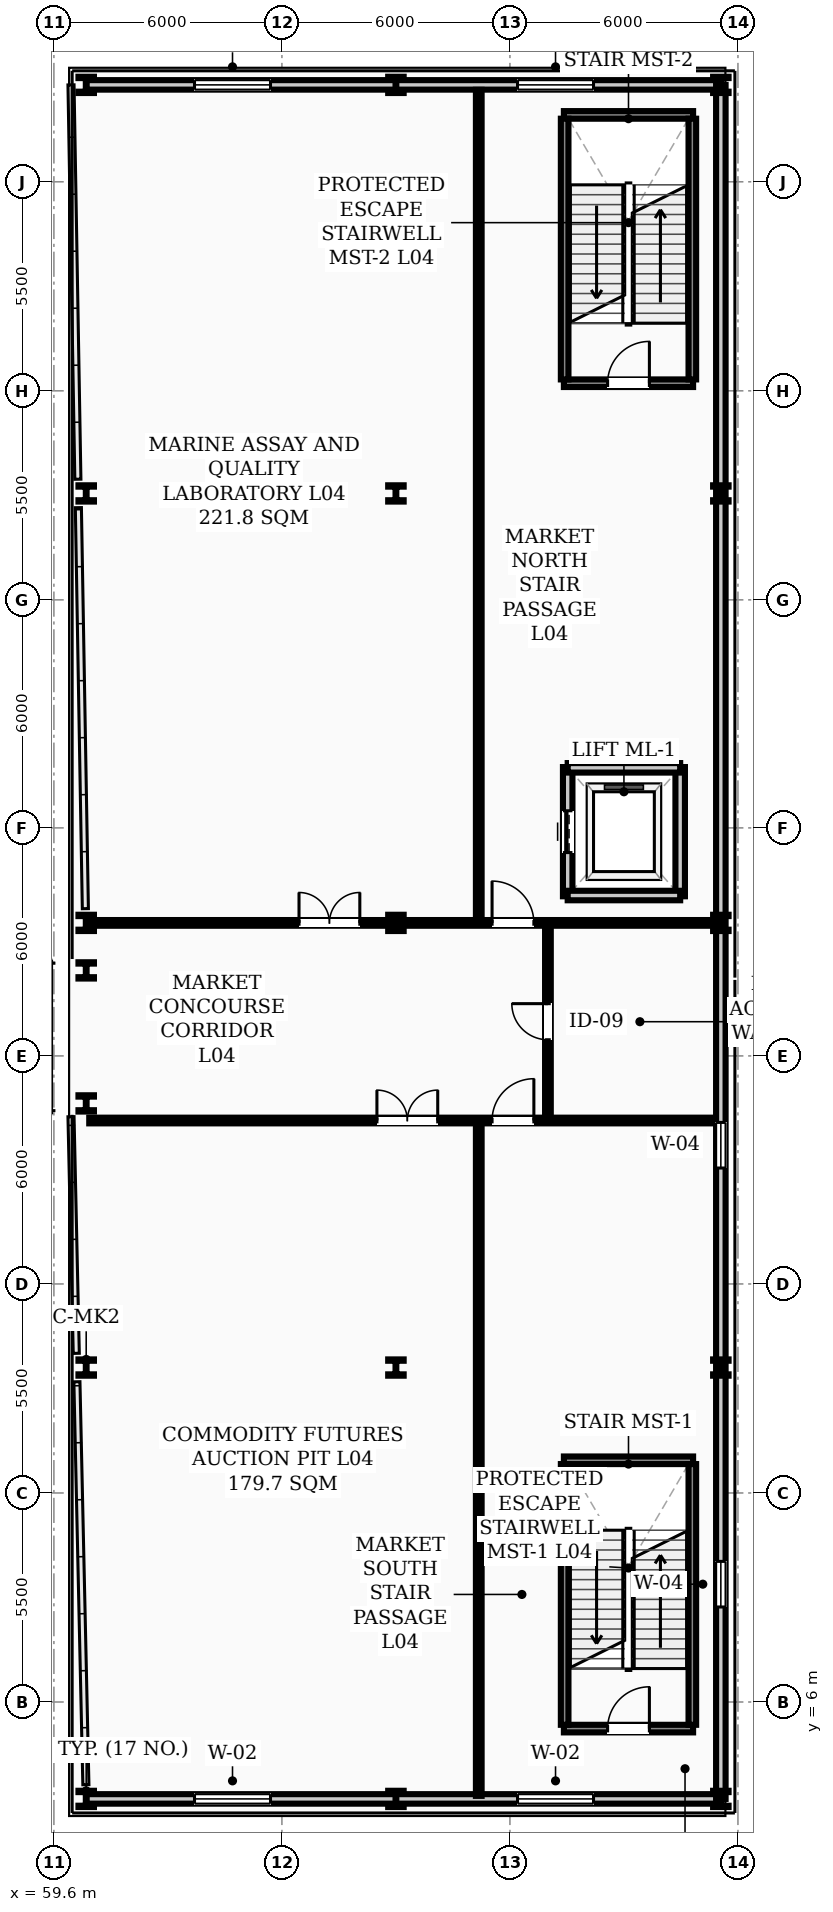
"""IFC4 building model, lengths in metres.
Left out: names, types, materials, properties, quantities, classifications, styles, units other than length and angle.
Written with IfcOpenShell. Run it as: python <this file> out.ifc"""

import sys

from ifc_helpers import new_model, si_unit, direction, frame, frame_2d, origin, origin_2d, place, context, subcontext, project, spatial, rectangle, i_section, extrude, element, fill, save


model = new_model("IFC4")
c1 = context("Model", 3, precision=1e-05, world=origin(), true_north=direction((0.0, 1.0)))
c2 = subcontext(c1, "Body", "Model", "MODEL_VIEW")
j1 = project(units=[si_unit("LENGTHUNIT", "METRE"), si_unit("PLANEANGLEUNIT", "RADIAN")], contexts=[c1])
p1 = place(None, origin())
s1 = spatial("IfcSite", under=j1, at=p1, CompositionType="ELEMENT")
p2 = place(p1, origin())
s2 = spatial("IfcBuilding", under=s1, at=p2, CompositionType="ELEMENT")
p3 = place(p2, frame((0.0, 0.0, 16.6)))
s3 = spatial("IfcBuildingStorey", under=s2, at=p3, CompositionType="ELEMENT", Elevation=16.6)
for number, where, z_axis, x_axis in (
    (1, (60.45, 3.45, 0.0), (0.0, 0.0, 1.0), (1.0, 0.0, 0.0)),
    (2, (60.45, 14.8, 0.0), (0.0, 0.0, 1.0), (1.0, 0.0, 0.0)),
    (3, (60.45, 21.75, 0.0), (0.0, 0.0, 1.0), (1.0, 0.0, 0.0)),
    (4, (60.45, 25.25, 0.0), (0.0, 0.0, 1.0), (1.0, 0.0, 0.0)),
    (5, (60.45, 26.5, 0.0), (0.0, 0.0, 1.0), (1.0, 0.0, 0.0)),
    (6, (60.45, 37.8, 0.0), (0.0, 0.0, 1.0), (1.0, 0.0, 0.0)),
    (7, (60.45, 48.55, 0.0), (0.0, 0.0, 1.0), (1.0, 0.0, 0.0)),
    (8, (68.6, 3.45, 0.0), (0.0, 0.0, 1.0), (1.0, 0.0, 0.0)),
    (9, (68.6, 14.8, 0.0), (0.0, 0.0, 1.0), (1.0, 0.0, 0.0)),
    (10, (68.6, 26.5, 0.0), (0.0, 0.0, 1.0), (1.0, 0.0, 0.0)),
    (11, (68.6, 37.8, 0.0), (0.0, 0.0, 1.0), (1.0, 0.0, 0.0)),
    (12, (68.6, 48.55, 0.0), (0.0, 0.0, 1.0), (1.0, 0.0, 0.0)),
    (13, (77.15, 3.45, 0.0), (0.0, 0.0, 1.0), (1.0, 0.0, 0.0)),
    (14, (77.15, 14.8, 0.0), (0.0, 0.0, 1.0), (1.0, 0.0, 0.0)),
    (15, (77.15, 26.5, 0.0), (0.0, 0.0, 1.0), (1.0, 0.0, 0.0)),
    (16, (77.15, 37.8, 0.0), (0.0, 0.0, 1.0), (1.0, 0.0, 0.0)),
    (17, (77.15, 48.55, 0.0), (0.0, 0.0, 1.0), (1.0, 0.0, 0.0)),
):
    element("IfcColumn", number, at=place(p3, frame(where, z_axis=z_axis, x_axis=x_axis)), inside=s3, PredefinedType="COLUMN", context=c2, shape_type="SweptSolid", body=[
        extrude(i_section(OverallWidth=0.407, OverallDepth=0.428, WebThickness=0.02, FlangeThickness=0.035, FilletRadius=0.022, at=origin_2d()), origin(), (0.0, 0.0, 1.0), 5.4),
    ])
p4 = place(p3, frame((60.45, 3.45, 0.0), z_axis=(0.0, 0.0, 1.0), x_axis=(1.0, 0.0, 0.0)))
e18 = element("IfcWall", 18, at=p4, inside=s3, PredefinedType="STANDARD", context=c2, shape_type="SweptSolid", body=[
    extrude(rectangle(XDim=16.7, YDim=0.25, at=frame_2d((8.35, 0.0))), origin(), (0.0, 0.0, 1.0), 4.51),
])
p5 = place(p4, frame((2.85, 0.0, 0.95)))
e19 = element("IfcOpeningElement", 19, at=p5, cuts=e18, PredefinedType="OPENING", context=c2, shape_type="SweptSolid", body=[
    extrude(rectangle(XDim=2.0, YDim=1.8, at=frame_2d((1.0, 0.9))), frame((0.0, 0.135, 0.0), z_axis=(0.0, -1.0, 0.0), x_axis=(1.0, 0.0, 0.0)), (0.0, 0.0, 1.0), 0.27),
])
p6 = place(p4, frame((11.35, 0.0, 0.95)))
e20 = element("IfcOpeningElement", 20, at=p6, cuts=e18, PredefinedType="OPENING", context=c2, shape_type="SweptSolid", body=[
    extrude(rectangle(XDim=2.0, YDim=1.8, at=frame_2d((1.0, 0.9))), frame((0.0, 0.135, 0.0), z_axis=(0.0, -1.0, 0.0), x_axis=(1.0, 0.0, 0.0)), (0.0, 0.0, 1.0), 0.27),
])
p7 = place(p3, frame((60.45, 48.55, 0.0), z_axis=(0.0, 0.0, 1.0), x_axis=(1.0, 0.0, 0.0)))
e21 = element("IfcWall", 21, at=p7, inside=s3, PredefinedType="STANDARD", context=c2, shape_type="SweptSolid", body=[
    extrude(rectangle(XDim=16.7, YDim=0.25, at=frame_2d((8.35, 0.0))), origin(), (0.0, 0.0, 1.0), 4.51),
])
p8 = place(p7, frame((2.85, 0.0, 0.95)))
e22 = element("IfcOpeningElement", 22, at=p8, cuts=e21, PredefinedType="OPENING", context=c2, shape_type="SweptSolid", body=[
    extrude(rectangle(XDim=2.0, YDim=1.8, at=frame_2d((1.0, 0.9))), frame((0.0, 0.135, 0.0), z_axis=(0.0, -1.0, 0.0), x_axis=(1.0, 0.0, 0.0)), (0.0, 0.0, 1.0), 0.27),
])
p9 = place(p7, frame((11.35, 0.0, 0.95)))
e23 = element("IfcOpeningElement", 23, at=p9, cuts=e21, PredefinedType="OPENING", context=c2, shape_type="SweptSolid", body=[
    extrude(rectangle(XDim=2.0, YDim=1.8, at=frame_2d((1.0, 0.9))), frame((0.0, 0.135, 0.0), z_axis=(0.0, -1.0, 0.0), x_axis=(1.0, 0.0, 0.0)), (0.0, 0.0, 1.0), 0.27),
])
p10 = place(p3, frame((77.15, 3.45, 0.0), z_axis=(0.0, 0.0, 1.0), x_axis=(0.0, 1.0, 0.0)))
e24 = element("IfcWall", 24, at=p10, inside=s3, PredefinedType="STANDARD", context=c2, shape_type="SweptSolid", body=[
    extrude(rectangle(XDim=45.1, YDim=0.25, at=frame_2d((22.55, 0.0))), origin(), (0.0, 0.0, 1.0), 4.51),
])
p11 = place(p10, frame((5.05, 0.0, 0.95)))
e25 = element("IfcOpeningElement", 25, at=p11, cuts=e24, PredefinedType="OPENING", context=c2, shape_type="SweptSolid", body=[
    extrude(rectangle(XDim=1.2, YDim=1.2, at=frame_2d((0.6, 0.6))), frame((0.0, 0.135, 0.0), z_axis=(0.0, -1.0, 0.0), x_axis=(1.0, 0.0, 0.0)), (0.0, 0.0, 1.0), 0.27),
])
p12 = place(p10, frame((16.6, 0.0, 0.95)))
e26 = element("IfcOpeningElement", 26, at=p12, cuts=e24, PredefinedType="OPENING", context=c2, shape_type="SweptSolid", body=[
    extrude(rectangle(XDim=1.2, YDim=1.2, at=frame_2d((0.6, 0.6))), frame((0.0, 0.135, 0.0), z_axis=(0.0, -1.0, 0.0), x_axis=(1.0, 0.0, 0.0)), (0.0, 0.0, 1.0), 0.27),
])
p13 = place(p3, frame((73.02, 5.3, 0.0), z_axis=(0.0, 0.0, 1.0), x_axis=(1.0, 0.0, 0.0)))
e27 = element("IfcWall", 27, at=p13, inside=s3, PredefinedType="STANDARD", context=c2, shape_type="SweptSolid", body=[
    extrude(rectangle(XDim=3.4, YDim=0.2, at=frame_2d((1.7, 0.0))), origin(), (0.0, 0.0, 1.0), 5.18),
])
p14 = place(p13, frame((1.15, 0.0, 0.0)))
e28 = element("IfcOpeningElement", 28, at=p14, cuts=e27, PredefinedType="OPENING", context=c2, shape_type="SweptSolid", body=[
    extrude(rectangle(XDim=1.1, YDim=2.08, at=frame_2d((0.55, 1.04))), frame((0.0, 0.11, 0.0), z_axis=(0.0, -1.0, 0.0), x_axis=(1.0, 0.0, 0.0)), (0.0, 0.0, 1.0), 0.22),
])
p15 = place(p3, frame((73.02, 12.36, 0.0), z_axis=(0.0, 0.0, 1.0), x_axis=(1.0, 0.0, 0.0)))
e29 = element("IfcWall", 29, at=p15, inside=s3, PredefinedType="STANDARD", context=c2, shape_type="SweptSolid", body=[
    extrude(rectangle(XDim=3.4, YDim=0.2, at=frame_2d((1.7, 0.0))), origin(), (0.0, 0.0, 1.0), 5.18),
])
for number, where, z_axis, x_axis in (
    (30, (73.04, 5.4, 0.0), (0.0, 0.0, 1.0), (0.0, 1.0, 0.0)),
    (31, (76.4, 5.4, 0.0), (0.0, 0.0, 1.0), (0.0, 1.0, 0.0)),
):
    element("IfcWall", number, at=place(p3, frame(where, z_axis=z_axis, x_axis=x_axis)), inside=s3, PredefinedType="STANDARD", context=c2, shape_type="SweptSolid", body=[
        extrude(rectangle(XDim=6.86, YDim=0.2, at=frame_2d((3.43, 0.0))), origin(), (0.0, 0.0, 1.0), 5.18),
    ])
p16 = place(p3, frame((73.02, 40.7, 0.0), z_axis=(0.0, 0.0, 1.0), x_axis=(1.0, 0.0, 0.0)))
e32 = element("IfcWall", 32, at=p16, inside=s3, PredefinedType="STANDARD", context=c2, shape_type="SweptSolid", body=[
    extrude(rectangle(XDim=3.4, YDim=0.2, at=frame_2d((1.7, 0.0))), origin(), (0.0, 0.0, 1.0), 5.18),
])
p17 = place(p16, frame((1.15, 0.0, 0.0)))
e33 = element("IfcOpeningElement", 33, at=p17, cuts=e32, PredefinedType="OPENING", context=c2, shape_type="SweptSolid", body=[
    extrude(rectangle(XDim=1.1, YDim=2.08, at=frame_2d((0.55, 1.04))), frame((0.0, 0.11, 0.0), z_axis=(0.0, -1.0, 0.0), x_axis=(1.0, 0.0, 0.0)), (0.0, 0.0, 1.0), 0.22),
])
p18 = place(p3, frame((73.02, 47.76, 0.0), z_axis=(0.0, 0.0, 1.0), x_axis=(1.0, 0.0, 0.0)))
e34 = element("IfcWall", 34, at=p18, inside=s3, PredefinedType="STANDARD", context=c2, shape_type="SweptSolid", body=[
    extrude(rectangle(XDim=3.4, YDim=0.2, at=frame_2d((1.7, 0.0))), origin(), (0.0, 0.0, 1.0), 5.18),
])
for number, where, z_axis, x_axis in (
    (35, (73.04, 40.8, 0.0), (0.0, 0.0, 1.0), (0.0, 1.0, 0.0)),
    (36, (76.4, 40.8, 0.0), (0.0, 0.0, 1.0), (0.0, 1.0, 0.0)),
):
    element("IfcWall", number, at=place(p3, frame(where, z_axis=z_axis, x_axis=x_axis)), inside=s3, PredefinedType="STANDARD", context=c2, shape_type="SweptSolid", body=[
        extrude(rectangle(XDim=6.86, YDim=0.2, at=frame_2d((3.43, 0.0))), origin(), (0.0, 0.0, 1.0), 5.18),
    ])
p19 = place(p3, frame((73.12, 27.2, 0.0), z_axis=(0.0, 0.0, 1.0), x_axis=(0.0, 1.0, 0.0)))
e37 = element("IfcWall", 37, at=p19, inside=s3, PredefinedType="STANDARD", context=c2, shape_type="SweptSolid", body=[
    extrude(rectangle(XDim=3.4, YDim=0.25, at=frame_2d((1.7, 0.0))), origin(), (0.0, 0.0, 1.0), 5.16),
])
p20 = place(p19, frame((1.15, 0.0, 0.0)))
e38 = element("IfcOpeningElement", 38, at=p20, cuts=e37, PredefinedType="OPENING", context=c2, shape_type="SweptSolid", body=[
    extrude(rectangle(XDim=1.1, YDim=2.08, at=frame_2d((0.55, 1.04))), frame((0.0, 0.135, 0.0), z_axis=(0.0, -1.0, 0.0), x_axis=(1.0, 0.0, 0.0)), (0.0, 0.0, 1.0), 0.27),
])
p21 = place(p3, frame((76.08, 27.2, 0.0), z_axis=(0.0, 0.0, 1.0), x_axis=(0.0, 1.0, 0.0)))
e39 = element("IfcWall", 39, at=p21, inside=s3, PredefinedType="STANDARD", context=c2, shape_type="SweptSolid", body=[
    extrude(rectangle(XDim=3.4, YDim=0.25, at=frame_2d((1.7, 0.0))), origin(), (0.0, 0.0, 1.0), 5.16),
])
for number, where, z_axis, x_axis in (
    (40, (73.12, 27.22, 0.0), (0.0, 0.0, 1.0), (1.0, 0.0, 0.0)),
    (41, (73.12, 30.58, 0.0), (0.0, 0.0, 1.0), (1.0, 0.0, 0.0)),
):
    element("IfcWall", number, at=place(p3, frame(where, z_axis=z_axis, x_axis=x_axis)), inside=s3, PredefinedType="STANDARD", context=c2, shape_type="SweptSolid", body=[
        extrude(rectangle(XDim=2.96, YDim=0.25, at=frame_2d((1.48, 0.0))), origin(), (0.0, 0.0, 1.0), 5.16),
    ])
p22 = place(p3, frame((60.53, 21.3, 0.0), z_axis=(0.0, 0.0, 1.0), x_axis=(1.0, 0.0, 0.0)))
e42 = element("IfcWall", 42, at=p22, inside=s3, PredefinedType="PARTITIONING", context=c2, shape_type="SweptSolid", body=[
    extrude(rectangle(XDim=16.49, YDim=0.15, at=frame_2d((8.245, 0.0))), origin(), (0.0, 0.0, 1.0), 4.56),
])
p23 = place(p22, frame((7.57, 0.0, 0.0)))
e43 = element("IfcOpeningElement", 43, at=p23, cuts=e42, PredefinedType="OPENING", context=c2, shape_type="SweptSolid", body=[
    extrude(rectangle(XDim=1.6, YDim=2.08, at=frame_2d((0.8, 1.04))), frame((0.0, 0.085, 0.0), z_axis=(0.0, -1.0, 0.0), x_axis=(1.0, 0.0, 0.0)), (0.0, 0.0, 1.0), 0.17),
])
p24 = place(p22, frame((10.6, 0.0, 0.0)))
e44 = element("IfcOpeningElement", 44, at=p24, cuts=e42, PredefinedType="OPENING", context=c2, shape_type="SweptSolid", body=[
    extrude(rectangle(XDim=1.1, YDim=2.08, at=frame_2d((0.55, 1.04))), frame((0.0, 0.085, 0.0), z_axis=(0.0, -1.0, 0.0), x_axis=(1.0, 0.0, 0.0)), (0.0, 0.0, 1.0), 0.17),
])
p25 = place(p3, frame((60.53, 26.5, 0.0), z_axis=(0.0, 0.0, 1.0), x_axis=(1.0, 0.0, 0.0)))
e45 = element("IfcWall", 45, at=p25, inside=s3, PredefinedType="PARTITIONING", context=c2, shape_type="SweptSolid", body=[
    extrude(rectangle(XDim=16.49, YDim=0.15, at=frame_2d((8.245, 0.0))), origin(), (0.0, 0.0, 1.0), 4.56),
])
p26 = place(p25, frame((5.52, 0.0, 0.0)))
e46 = element("IfcOpeningElement", 46, at=p26, cuts=e45, PredefinedType="OPENING", context=c2, shape_type="SweptSolid", body=[
    extrude(rectangle(XDim=1.6, YDim=2.08, at=frame_2d((0.8, 1.04))), frame((0.0, 0.085, 0.0), z_axis=(0.0, -1.0, 0.0), x_axis=(1.0, 0.0, 0.0)), (0.0, 0.0, 1.0), 0.17),
])
p27 = place(p25, frame((10.6, 0.0, 0.0)))
e47 = element("IfcOpeningElement", 47, at=p27, cuts=e45, PredefinedType="OPENING", context=c2, shape_type="SweptSolid", body=[
    extrude(rectangle(XDim=1.1, YDim=2.08, at=frame_2d((0.55, 1.04))), frame((0.0, 0.085, 0.0), z_axis=(0.0, -1.0, 0.0), x_axis=(1.0, 0.0, 0.0)), (0.0, 0.0, 1.0), 0.17),
])
p28 = place(p3, frame((72.6, 21.385, 0.0), z_axis=(0.0, 0.0, 1.0), x_axis=(0.0, 1.0, 0.0)))
e48 = element("IfcWall", 48, at=p28, inside=s3, PredefinedType="PARTITIONING", context=c2, shape_type="SweptSolid", body=[
    extrude(rectangle(XDim=5.03, YDim=0.15, at=frame_2d((2.515, 0.0))), origin(), (0.0, 0.0, 1.0), 4.56),
])
p29 = place(p28, frame((2.04, 0.0, 0.0)))
e49 = element("IfcOpeningElement", 49, at=p29, cuts=e48, PredefinedType="OPENING", context=c2, shape_type="SweptSolid", body=[
    extrude(rectangle(XDim=0.95, YDim=2.08, at=frame_2d((0.475, 1.04))), frame((0.0, 0.085, 0.0), z_axis=(0.0, -1.0, 0.0), x_axis=(1.0, 0.0, 0.0)), (0.0, 0.0, 1.0), 0.17),
])
p30 = place(p3, frame((70.78, 3.53, 0.0), z_axis=(0.0, 0.0, 1.0), x_axis=(0.0, 1.0, 0.0)))
e50 = element("IfcWall", 50, at=p30, inside=s3, PredefinedType="PARTITIONING", context=c2, shape_type="SweptSolid", body=[
    extrude(rectangle(XDim=17.685, YDim=0.15, at=frame_2d((8.843, 0.0))), origin(), (0.0, 0.0, 1.0), 4.56),
])
p31 = place(p3, frame((70.78, 26.585, 0.0), z_axis=(0.0, 0.0, 1.0), x_axis=(0.0, 1.0, 0.0)))
e51 = element("IfcWall", 51, at=p31, inside=s3, PredefinedType="PARTITIONING", context=c2, shape_type="SweptSolid", body=[
    extrude(rectangle(XDim=21.835, YDim=0.15, at=frame_2d((10.917, 0.0))), origin(), (0.0, 0.0, 1.0), 4.56),
])
p32 = place(p5, origin())
e52 = element("IfcWindow", 52, at=p32, inside=s3, PartitioningType="SINGLE_PANEL", PredefinedType="WINDOW", context=c2, shape_type="SweptSolid", body=[
    extrude(rectangle(XDim=2.0, YDim=1.8, at=frame_2d((1.0, 0.9))), frame((0.0, 0.03, 0.0), z_axis=(0.0, -1.0, 0.0), x_axis=(1.0, 0.0, 0.0)), (0.0, 0.0, 1.0), 0.06),
])
fill(e19, e52)
p33 = place(p8, origin())
e53 = element("IfcWindow", 53, at=p33, inside=s3, PartitioningType="SINGLE_PANEL", PredefinedType="WINDOW", context=c2, shape_type="SweptSolid", body=[
    extrude(rectangle(XDim=2.0, YDim=1.8, at=frame_2d((1.0, 0.9))), frame((0.0, 0.03, 0.0), z_axis=(0.0, -1.0, 0.0), x_axis=(1.0, 0.0, 0.0)), (0.0, 0.0, 1.0), 0.06),
])
fill(e22, e53)
p34 = place(p6, origin())
e54 = element("IfcWindow", 54, at=p34, inside=s3, PartitioningType="SINGLE_PANEL", PredefinedType="WINDOW", context=c2, shape_type="SweptSolid", body=[
    extrude(rectangle(XDim=2.0, YDim=1.8, at=frame_2d((1.0, 0.9))), frame((0.0, 0.03, 0.0), z_axis=(0.0, -1.0, 0.0), x_axis=(1.0, 0.0, 0.0)), (0.0, 0.0, 1.0), 0.06),
])
fill(e20, e54)
p35 = place(p9, origin())
e55 = element("IfcWindow", 55, at=p35, inside=s3, PartitioningType="SINGLE_PANEL", PredefinedType="WINDOW", context=c2, shape_type="SweptSolid", body=[
    extrude(rectangle(XDim=2.0, YDim=1.8, at=frame_2d((1.0, 0.9))), frame((0.0, 0.03, 0.0), z_axis=(0.0, -1.0, 0.0), x_axis=(1.0, 0.0, 0.0)), (0.0, 0.0, 1.0), 0.06),
])
fill(e23, e55)
p36 = place(p11, origin())
e56 = element("IfcWindow", 56, at=p36, inside=s3, PartitioningType="SINGLE_PANEL", PredefinedType="WINDOW", context=c2, shape_type="SweptSolid", body=[
    extrude(rectangle(XDim=1.2, YDim=1.2, at=frame_2d((0.6, 0.6))), frame((0.0, 0.03, 0.0), z_axis=(0.0, -1.0, 0.0), x_axis=(1.0, 0.0, 0.0)), (0.0, 0.0, 1.0), 0.06),
])
fill(e25, e56)
p37 = place(p12, origin())
e57 = element("IfcWindow", 57, at=p37, inside=s3, PartitioningType="SINGLE_PANEL", PredefinedType="WINDOW", context=c2, shape_type="SweptSolid", body=[
    extrude(rectangle(XDim=1.2, YDim=1.2, at=frame_2d((0.6, 0.6))), frame((0.0, 0.03, 0.0), z_axis=(0.0, -1.0, 0.0), x_axis=(1.0, 0.0, 0.0)), (0.0, 0.0, 1.0), 0.06),
])
fill(e26, e57)
p38 = place(p14, origin())
e58 = element("IfcDoor", 58, at=p38, inside=s3, OperationType="SINGLE_SWING_RIGHT", PredefinedType="DOOR", context=c2, shape_type="SweptSolid", body=[
    extrude(rectangle(XDim=1.1, YDim=2.08, at=frame_2d((0.55, 1.04))), frame((0.0, 0.025, 0.0), z_axis=(0.0, -1.0, 0.0), x_axis=(1.0, 0.0, 0.0)), (0.0, 0.0, 1.0), 0.05),
])
fill(e28, e58)
p39 = place(p17, origin())
e59 = element("IfcDoor", 59, at=p39, inside=s3, OperationType="SINGLE_SWING_RIGHT", PredefinedType="DOOR", context=c2, shape_type="SweptSolid", body=[
    extrude(rectangle(XDim=1.1, YDim=2.08, at=frame_2d((0.55, 1.04))), frame((0.0, 0.025, 0.0), z_axis=(0.0, -1.0, 0.0), x_axis=(1.0, 0.0, 0.0)), (0.0, 0.0, 1.0), 0.05),
])
fill(e33, e59)
p40 = place(p23, origin())
e60 = element("IfcDoor", 60, at=p40, inside=s3, OperationType="DOUBLE_DOOR_SINGLE_SWING", PredefinedType="DOOR", context=c2, shape_type="SweptSolid", body=[
    extrude(rectangle(XDim=1.6, YDim=2.08, at=frame_2d((0.8, 1.04))), frame((0.0, 0.025, 0.0), z_axis=(0.0, -1.0, 0.0), x_axis=(1.0, 0.0, 0.0)), (0.0, 0.0, 1.0), 0.05),
])
fill(e43, e60)
p41 = place(p26, origin())
e61 = element("IfcDoor", 61, at=p41, inside=s3, OperationType="DOUBLE_DOOR_SINGLE_SWING", PredefinedType="DOOR", context=c2, shape_type="SweptSolid", body=[
    extrude(rectangle(XDim=1.6, YDim=2.08, at=frame_2d((0.8, 1.04))), frame((0.0, 0.025, 0.0), z_axis=(0.0, -1.0, 0.0), x_axis=(1.0, 0.0, 0.0)), (0.0, 0.0, 1.0), 0.05),
])
fill(e46, e61)
p42 = place(p24, origin())
e62 = element("IfcDoor", 62, at=p42, inside=s3, OperationType="SINGLE_SWING_RIGHT", PredefinedType="DOOR", context=c2, shape_type="SweptSolid", body=[
    extrude(rectangle(XDim=1.1, YDim=2.08, at=frame_2d((0.55, 1.04))), frame((0.0, 0.025, 0.0), z_axis=(0.0, -1.0, 0.0), x_axis=(1.0, 0.0, 0.0)), (0.0, 0.0, 1.0), 0.05),
])
fill(e44, e62)
p43 = place(p27, origin())
e63 = element("IfcDoor", 63, at=p43, inside=s3, OperationType="SINGLE_SWING_LEFT", PredefinedType="DOOR", context=c2, shape_type="SweptSolid", body=[
    extrude(rectangle(XDim=1.1, YDim=2.08, at=frame_2d((0.55, 1.04))), frame((0.0, 0.025, 0.0), z_axis=(0.0, -1.0, 0.0), x_axis=(1.0, 0.0, 0.0)), (0.0, 0.0, 1.0), 0.05),
])
fill(e47, e63)
p44 = place(p29, origin())
e64 = element("IfcDoor", 64, at=p44, inside=s3, OperationType="SINGLE_SWING_RIGHT", PredefinedType="DOOR", context=c2, shape_type="SweptSolid", body=[
    extrude(rectangle(XDim=0.95, YDim=2.08, at=frame_2d((0.475, 1.04))), frame((0.0, 0.025, 0.0), z_axis=(0.0, -1.0, 0.0), x_axis=(1.0, 0.0, 0.0)), (0.0, 0.0, 1.0), 0.05),
])
fill(e49, e64)
p45 = place(p20, origin())
e65 = element("IfcDoor", 65, at=p45, inside=s3, OperationType="SLIDING_TO_LEFT", PredefinedType="DOOR", context=c2, shape_type="SweptSolid", body=[
    extrude(rectangle(XDim=1.1, YDim=2.08, at=frame_2d((0.55, 1.04))), frame((0.0, 0.025, 0.0), z_axis=(0.0, -1.0, 0.0), x_axis=(1.0, 0.0, 0.0)), (0.0, 0.0, 1.0), 0.05),
])
fill(e38, e65)
save(model, sys.argv[1])
